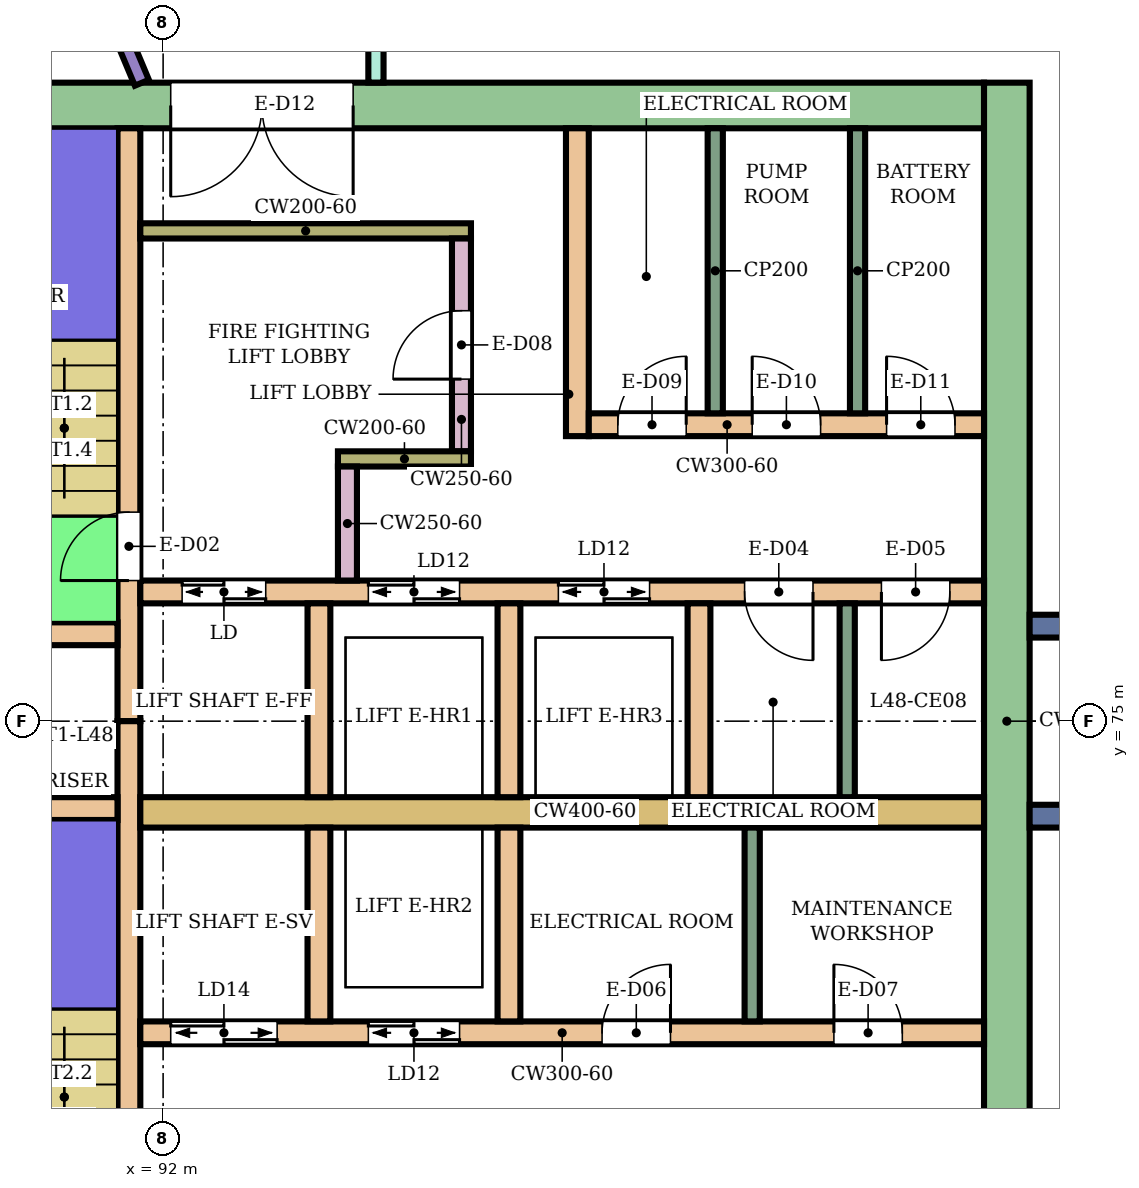
"""IFC4 building model, lengths in metres.
Left out: names, types, materials, properties, quantities, classifications, styles, units other than length and angle.
Written with IfcOpenShell. Run it as: python <this file> out.ifc"""

import sys

from ifc_helpers import new_model, si_unit, direction, frame, frame_2d, origin, place, context, subcontext, project, spatial, rectangle, extrude, element, fill, save


model = new_model("IFC4")
c1 = context("Model", 3, precision=1e-05, world=origin(), true_north=direction((0.0, 1.0)))
c2 = subcontext(c1, "Body", "Model", "MODEL_VIEW")
j1 = project(units=[si_unit("LENGTHUNIT", "METRE"), si_unit("PLANEANGLEUNIT", "RADIAN")], contexts=[c1])
p1 = place(None, origin())
s1 = spatial("IfcSite", under=j1, at=p1, CompositionType="ELEMENT")
p2 = place(p1, origin())
s2 = spatial("IfcBuilding", under=s1, at=p2, CompositionType="ELEMENT")
p3 = place(p2, frame((0.0, 0.0, 206.9)))
s3 = spatial("IfcBuildingStorey", under=s2, at=p3, CompositionType="ELEMENT", Elevation=206.9)
p4 = place(p3, frame((87.9, 83.1, 0.0), z_axis=(0.0, 0.0, 1.0), x_axis=(1.0, 0.0, 0.0)))
e1 = element("IfcWall", 1, at=p4, inside=s3, PredefinedType="SHEAR", context=c2, shape_type="SweptSolid", body=[
    extrude(rectangle(XDim=14.9, YDim=0.6, at=frame_2d((7.45, 0.0))), origin(), (0.0, 0.0, 1.0), 5.28),
])
p5 = place(p4, frame((4.2, 0.0, 0.0)))
e2 = element("IfcOpeningElement", 2, at=p5, cuts=e1, PredefinedType="OPENING", context=c2, shape_type="SweptSolid", body=[
    extrude(rectangle(XDim=2.4, YDim=2.4, at=frame_2d((1.2, 1.2))), frame((0.0, 0.31, 0.0), z_axis=(0.0, -1.0, 0.0), x_axis=(1.0, 0.0, 0.0)), (0.0, 0.0, 1.0), 0.62),
])
p6 = place(p3, frame((103.1, 66.6, 0.0), z_axis=(0.0, 0.0, 1.0), x_axis=(0.0, 1.0, 0.0)))
e3 = element("IfcWall", 3, at=p6, inside=s3, PredefinedType="SHEAR", context=c2, shape_type="SweptSolid", body=[
    extrude(rectangle(XDim=16.8, YDim=0.6, at=frame_2d((8.4, 0.0))), origin(), (0.0, 0.0, 1.0), 5.28),
])
p7 = place(p3, frame((91.55, 75.0, 0.0), z_axis=(0.0, 0.0, 1.0), x_axis=(0.0, 1.0, 0.0)))
e4 = element("IfcWall", 4, at=p7, inside=s3, PredefinedType="SHEAR", context=c2, shape_type="SweptSolid", body=[
    extrude(rectangle(XDim=7.8, YDim=0.3, at=frame_2d((3.9, 0.0))), origin(), (0.0, 0.0, 1.0), 5.28),
])
p8 = place(p7, frame((1.85, 0.0, 0.0)))
e5 = element("IfcOpeningElement", 5, at=p8, cuts=e4, PredefinedType="OPENING", context=c2, shape_type="SweptSolid", body=[
    extrude(rectangle(XDim=0.9, YDim=2.1, at=frame_2d((0.45, 1.05))), frame((0.0, 0.16, 0.0), z_axis=(0.0, -1.0, 0.0), x_axis=(1.0, 0.0, 0.0)), (0.0, 0.0, 1.0), 0.32),
])
p9 = place(p3, frame((91.55, 67.2, 0.0), z_axis=(0.0, 0.0, 1.0), x_axis=(0.0, 1.0, 0.0)))
e6 = element("IfcWall", 6, at=p9, inside=s3, PredefinedType="SHEAR", context=c2, shape_type="SweptSolid", body=[
    extrude(rectangle(XDim=7.8, YDim=0.3, at=frame_2d((3.9, 0.0))), origin(), (0.0, 0.0, 1.0), 5.28),
])
p10 = place(p9, frame((0.45, 0.0, 0.0)))
e7 = element("IfcOpeningElement", 7, at=p10, cuts=e6, PredefinedType="OPENING", context=c2, shape_type="SweptSolid", body=[
    extrude(rectangle(XDim=0.9, YDim=2.1, at=frame_2d((0.45, 1.05))), frame((0.0, 0.16, 0.0), z_axis=(0.0, -1.0, 0.0), x_axis=(1.0, 0.0, 0.0)), (0.0, 0.0, 1.0), 0.32),
])
p11 = place(p3, frame((88.35, 76.15, 0.0), z_axis=(0.0, 0.0, 1.0), x_axis=(1.0, 0.0, 0.0)))
e8 = element("IfcWall", 8, at=p11, inside=s3, PredefinedType="SHEAR", context=c2, shape_type="SweptSolid", body=[
    extrude(rectangle(XDim=3.05, YDim=0.3, at=frame_2d((1.525, 0.0))), origin(), (0.0, 0.0, 1.0), 5.28),
])
p12 = place(p11, frame((1.1, 0.0, 0.0)))
e9 = element("IfcOpeningElement", 9, at=p12, cuts=e8, PredefinedType="OPENING", context=c2, shape_type="SweptSolid", body=[
    extrude(rectangle(XDim=0.7, YDim=2.0, at=frame_2d((0.35, 1.0))), frame((0.0, 0.16, 0.0), z_axis=(0.0, -1.0, 0.0), x_axis=(1.0, 0.0, 0.0)), (0.0, 0.0, 1.0), 0.32),
])
p13 = place(p3, frame((88.35, 73.85, 0.0), z_axis=(0.0, 0.0, 1.0), x_axis=(1.0, 0.0, 0.0)))
e10 = element("IfcWall", 10, at=p13, inside=s3, PredefinedType="SHEAR", context=c2, shape_type="SweptSolid", body=[
    extrude(rectangle(XDim=3.05, YDim=0.3, at=frame_2d((1.525, 0.0))), origin(), (0.0, 0.0, 1.0), 5.28),
])
p14 = place(p3, frame((91.7, 76.7, 0.0), z_axis=(0.0, 0.0, 1.0), x_axis=(1.0, 0.0, 0.0)))
e11 = element("IfcWall", 11, at=p14, inside=s3, PredefinedType="SHEAR", context=c2, shape_type="SweptSolid", body=[
    extrude(rectangle(XDim=11.1, YDim=0.3, at=frame_2d((5.55, 0.0))), origin(), (0.0, 0.0, 1.0), 5.28),
])
p15 = place(p14, frame((0.55, 0.0, 0.0)))
e12 = element("IfcOpeningElement", 12, at=p15, cuts=e11, PredefinedType="OPENING", context=c2, shape_type="SweptSolid", body=[
    extrude(rectangle(XDim=1.1, YDim=2.1, at=frame_2d((0.55, 1.05))), frame((0.0, 0.16, 0.0), z_axis=(0.0, -1.0, 0.0), x_axis=(1.0, 0.0, 0.0)), (0.0, 0.0, 1.0), 0.32),
])
p16 = place(p14, frame((3.0, 0.0, 0.0)))
e13 = element("IfcOpeningElement", 13, at=p16, cuts=e11, PredefinedType="OPENING", context=c2, shape_type="SweptSolid", body=[
    extrude(rectangle(XDim=1.2, YDim=2.1, at=frame_2d((0.6, 1.05))), frame((0.0, 0.16, 0.0), z_axis=(0.0, -1.0, 0.0), x_axis=(1.0, 0.0, 0.0)), (0.0, 0.0, 1.0), 0.32),
])
p17 = place(p14, frame((5.5, 0.0, 0.0)))
e14 = element("IfcOpeningElement", 14, at=p17, cuts=e11, PredefinedType="OPENING", context=c2, shape_type="SweptSolid", body=[
    extrude(rectangle(XDim=1.2, YDim=2.1, at=frame_2d((0.6, 1.05))), frame((0.0, 0.16, 0.0), z_axis=(0.0, -1.0, 0.0), x_axis=(1.0, 0.0, 0.0)), (0.0, 0.0, 1.0), 0.32),
])
p18 = place(p14, frame((7.95, 0.0, 0.0)))
e15 = element("IfcOpeningElement", 15, at=p18, cuts=e11, PredefinedType="OPENING", context=c2, shape_type="SweptSolid", body=[
    extrude(rectangle(XDim=0.9, YDim=2.1, at=frame_2d((0.45, 1.05))), frame((0.0, 0.16, 0.0), z_axis=(0.0, -1.0, 0.0), x_axis=(1.0, 0.0, 0.0)), (0.0, 0.0, 1.0), 0.32),
])
p19 = place(p14, frame((9.75, 0.0, 0.0)))
e16 = element("IfcOpeningElement", 16, at=p19, cuts=e11, PredefinedType="OPENING", context=c2, shape_type="SweptSolid", body=[
    extrude(rectangle(XDim=0.9, YDim=2.1, at=frame_2d((0.45, 1.05))), frame((0.0, 0.16, 0.0), z_axis=(0.0, -1.0, 0.0), x_axis=(1.0, 0.0, 0.0)), (0.0, 0.0, 1.0), 0.32),
])
p20 = place(p3, frame((91.7, 73.8, 0.0), z_axis=(0.0, 0.0, 1.0), x_axis=(1.0, 0.0, 0.0)))
e17 = element("IfcWall", 17, at=p20, inside=s3, PredefinedType="SHEAR", context=c2, shape_type="SweptSolid", body=[
    extrude(rectangle(XDim=11.1, YDim=0.4, at=frame_2d((5.55, 0.0))), origin(), (0.0, 0.0, 1.0), 5.28),
])
p21 = place(p3, frame((91.7, 70.9, 0.0), z_axis=(0.0, 0.0, 1.0), x_axis=(1.0, 0.0, 0.0)))
e18 = element("IfcWall", 18, at=p21, inside=s3, PredefinedType="SHEAR", context=c2, shape_type="SweptSolid", body=[
    extrude(rectangle(XDim=11.1, YDim=0.3, at=frame_2d((5.55, 0.0))), origin(), (0.0, 0.0, 1.0), 5.28),
])
p22 = place(p21, frame((0.4, 0.0, 0.0)))
e19 = element("IfcOpeningElement", 19, at=p22, cuts=e18, PredefinedType="OPENING", context=c2, shape_type="SweptSolid", body=[
    extrude(rectangle(XDim=1.4, YDim=2.1, at=frame_2d((0.7, 1.05))), frame((0.0, 0.16, 0.0), z_axis=(0.0, -1.0, 0.0), x_axis=(1.0, 0.0, 0.0)), (0.0, 0.0, 1.0), 0.32),
])
p23 = place(p21, frame((3.0, 0.0, 0.0)))
e20 = element("IfcOpeningElement", 20, at=p23, cuts=e18, PredefinedType="OPENING", context=c2, shape_type="SweptSolid", body=[
    extrude(rectangle(XDim=1.2, YDim=2.1, at=frame_2d((0.6, 1.05))), frame((0.0, 0.16, 0.0), z_axis=(0.0, -1.0, 0.0), x_axis=(1.0, 0.0, 0.0)), (0.0, 0.0, 1.0), 0.32),
])
p24 = place(p21, frame((6.075, 0.0, 0.0)))
e21 = element("IfcOpeningElement", 21, at=p24, cuts=e18, PredefinedType="OPENING", context=c2, shape_type="SweptSolid", body=[
    extrude(rectangle(XDim=0.9, YDim=2.1, at=frame_2d((0.45, 1.05))), frame((0.0, 0.16, 0.0), z_axis=(0.0, -1.0, 0.0), x_axis=(1.0, 0.0, 0.0)), (0.0, 0.0, 1.0), 0.32),
])
p25 = place(p21, frame((9.125, 0.0, 0.0)))
e22 = element("IfcOpeningElement", 22, at=p25, cuts=e18, PredefinedType="OPENING", context=c2, shape_type="SweptSolid", body=[
    extrude(rectangle(XDim=0.9, YDim=2.1, at=frame_2d((0.45, 1.05))), frame((0.0, 0.16, 0.0), z_axis=(0.0, -1.0, 0.0), x_axis=(1.0, 0.0, 0.0)), (0.0, 0.0, 1.0), 0.32),
])
for number, where, z_axis, x_axis in (
    (23, (94.05, 74.0, 0.0), (0.0, 0.0, 1.0), (0.0, 1.0, 0.0)),
    (24, (96.55, 74.0, 0.0), (0.0, 0.0, 1.0), (0.0, 1.0, 0.0)),
    (25, (99.05, 74.0, 0.0), (0.0, 0.0, 1.0), (0.0, 1.0, 0.0)),
    (26, (94.05, 71.05, 0.0), (0.0, 0.0, 1.0), (0.0, 1.0, 0.0)),
    (27, (96.55, 71.05, 0.0), (0.0, 0.0, 1.0), (0.0, 1.0, 0.0)),
):
    element("IfcWall", number, at=place(p3, frame(where, z_axis=z_axis, x_axis=x_axis)), inside=s3, PredefinedType="SHEAR", context=c2, shape_type="SweptSolid", body=[
        extrude(rectangle(XDim=2.55, YDim=0.3, at=frame_2d((1.275, 0.0))), origin(), (0.0, 0.0, 1.0), 5.28),
    ])
p26 = place(p3, frame((91.7, 81.45, 0.0), z_axis=(0.0, 0.0, 1.0), x_axis=(1.0, 0.0, 0.0)))
e28 = element("IfcWall", 28, at=p26, inside=s3, PredefinedType="SHEAR", context=c2, shape_type="SweptSolid", body=[
    extrude(rectangle(XDim=4.35, YDim=0.2, at=frame_2d((2.175, 0.0))), origin(), (0.0, 0.0, 1.0), 5.28),
])
p27 = place(p3, frame((95.925, 78.55, 0.0), z_axis=(0.0, 0.0, 1.0), x_axis=(0.0, 1.0, 0.0)))
e29 = element("IfcWall", 29, at=p27, inside=s3, PredefinedType="SHEAR", context=c2, shape_type="SweptSolid", body=[
    extrude(rectangle(XDim=2.8, YDim=0.25, at=frame_2d((1.4, 0.0))), origin(), (0.0, 0.0, 1.0), 5.28),
])
p28 = place(p27, frame((0.95, 0.0, 0.0)))
e30 = element("IfcOpeningElement", 30, at=p28, cuts=e29, PredefinedType="OPENING", context=c2, shape_type="SweptSolid", body=[
    extrude(rectangle(XDim=0.9, YDim=2.1, at=frame_2d((0.45, 1.05))), frame((0.0, 0.135, 0.0), z_axis=(0.0, -1.0, 0.0), x_axis=(1.0, 0.0, 0.0)), (0.0, 0.0, 1.0), 0.27),
])
p29 = place(p3, frame((94.3, 78.45, 0.0), z_axis=(0.0, 0.0, 1.0), x_axis=(1.0, 0.0, 0.0)))
e31 = element("IfcWall", 31, at=p29, inside=s3, PredefinedType="SHEAR", context=c2, shape_type="SweptSolid", body=[
    extrude(rectangle(XDim=1.75, YDim=0.2, at=frame_2d((0.875, 0.0))), origin(), (0.0, 0.0, 1.0), 5.28),
])
p30 = place(p3, frame((94.425, 76.85, 0.0), z_axis=(0.0, 0.0, 1.0), x_axis=(0.0, 1.0, 0.0)))
e32 = element("IfcWall", 32, at=p30, inside=s3, PredefinedType="SHEAR", context=c2, shape_type="SweptSolid", body=[
    extrude(rectangle(XDim=1.5, YDim=0.25, at=frame_2d((0.75, 0.0))), origin(), (0.0, 0.0, 1.0), 5.28),
])
p31 = place(p3, frame((97.45, 78.75, 0.0), z_axis=(0.0, 0.0, 1.0), x_axis=(0.0, 1.0, 0.0)))
e33 = element("IfcWall", 33, at=p31, inside=s3, PredefinedType="SHEAR", context=c2, shape_type="SweptSolid", body=[
    extrude(rectangle(XDim=4.05, YDim=0.3, at=frame_2d((2.025, 0.0))), origin(), (0.0, 0.0, 1.0), 5.28),
])
p32 = place(p3, frame((97.6, 78.9, 0.0), z_axis=(0.0, 0.0, 1.0), x_axis=(1.0, 0.0, 0.0)))
e34 = element("IfcWall", 34, at=p32, inside=s3, PredefinedType="SHEAR", context=c2, shape_type="SweptSolid", body=[
    extrude(rectangle(XDim=5.2, YDim=0.3, at=frame_2d((2.6, 0.0))), origin(), (0.0, 0.0, 1.0), 5.28),
])
p33 = place(p32, frame((0.382, 0.0, 0.0)))
e35 = element("IfcOpeningElement", 35, at=p33, cuts=e34, PredefinedType="OPENING", context=c2, shape_type="SweptSolid", body=[
    extrude(rectangle(XDim=0.9, YDim=2.1, at=frame_2d((0.45, 1.05))), frame((0.0, 0.16, 0.0), z_axis=(0.0, -1.0, 0.0), x_axis=(1.0, 0.0, 0.0)), (0.0, 0.0, 1.0), 0.32),
])
p34 = place(p32, frame((2.15, 0.0, 0.0)))
e36 = element("IfcOpeningElement", 36, at=p34, cuts=e34, PredefinedType="OPENING", context=c2, shape_type="SweptSolid", body=[
    extrude(rectangle(XDim=0.9, YDim=2.1, at=frame_2d((0.45, 1.05))), frame((0.0, 0.16, 0.0), z_axis=(0.0, -1.0, 0.0), x_axis=(1.0, 0.0, 0.0)), (0.0, 0.0, 1.0), 0.32),
])
p35 = place(p32, frame((3.918, 0.0, 0.0)))
e37 = element("IfcOpeningElement", 37, at=p35, cuts=e34, PredefinedType="OPENING", context=c2, shape_type="SweptSolid", body=[
    extrude(rectangle(XDim=0.9, YDim=2.1, at=frame_2d((0.45, 1.05))), frame((0.0, 0.16, 0.0), z_axis=(0.0, -1.0, 0.0), x_axis=(1.0, 0.0, 0.0)), (0.0, 0.0, 1.0), 0.32),
])
for number, where, z_axis, x_axis in (
    (38, (103.4, 73.75, 0.0), (0.0, 0.0, 1.0), (1.0, 0.0, 0.0)),
    (39, (103.4, 76.25, 0.0), (0.0, 0.0, 1.0), (1.0, 0.0, 0.0)),
):
    element("IfcWall", number, at=place(p3, frame(where, z_axis=z_axis, x_axis=x_axis)), inside=s3, PredefinedType="NOTDEFINED", context=c2, shape_type="SweptSolid", body=[
        extrude(rectangle(XDim=2.416, YDim=0.3, at=frame_2d((1.208, 0.0))), origin(), (0.0, 0.0, 1.0), 5.6),
    ])
p36 = place(p3, frame((88.697, 90.624, 0.0), z_axis=(0.0, 0.0, 1.0), x_axis=(0.386027055918, -0.922487459047, 0.0)))
e40 = element("IfcWall", 40, at=p36, inside=s3, PredefinedType="PARTITIONING", context=c2, shape_type="SweptSolid", body=[
    extrude(rectangle(XDim=7.832, YDim=0.2, at=frame_2d((3.916, 0.0))), origin(), (0.0, 0.0, 1.0), 5.15),
])
p37 = place(p36, frame((3.482, 0.0, 0.0)))
e41 = element("IfcOpeningElement", 41, at=p37, cuts=e40, PredefinedType="OPENING", context=c2, shape_type="SweptSolid", body=[
    extrude(rectangle(XDim=1.2, YDim=2.4, at=frame_2d((0.6, 1.2))), frame((0.0, 0.11, 0.0), z_axis=(0.0, -1.0, 0.0), x_axis=(1.0, 0.0, 0.0)), (0.0, 0.0, 1.0), 0.22),
])
p38 = place(p3, frame((94.8, 83.401, 0.0), z_axis=(0.0, 0.0, 1.0), x_axis=(0.0, 1.0, 0.0)))
e42 = element("IfcWall", 42, at=p38, inside=s3, PredefinedType="PARTITIONING", context=c2, shape_type="SweptSolid", body=[
    extrude(rectangle(XDim=1.499, YDim=0.2, at=frame_2d((0.75, 0.0))), origin(), (0.0, 0.0, 1.0), 5.15),
])
for number, where, z_axis, x_axis in (
    (43, (101.0, 74.0, 0.0), (0.0, 0.0, 1.0), (0.0, 1.0, 0.0)),
    (44, (99.75, 71.05, 0.0), (0.0, 0.0, 1.0), (0.0, 1.0, 0.0)),
):
    element("IfcWall", number, at=place(p3, frame(where, z_axis=z_axis, x_axis=x_axis)), inside=s3, PredefinedType="PARTITIONING", context=c2, shape_type="SweptSolid", body=[
        extrude(rectangle(XDim=2.55, YDim=0.2, at=frame_2d((1.275, 0.0))), origin(), (0.0, 0.0, 1.0), 5.28),
    ])
for number, where, z_axis, x_axis in (
    (45, (99.264, 79.05, 0.0), (0.0, 0.0, 1.0), (0.0, 1.0, 0.0)),
    (46, (101.136, 79.05, 0.0), (0.0, 0.0, 1.0), (0.0, 1.0, 0.0)),
):
    element("IfcWall", number, at=place(p3, frame(where, z_axis=z_axis, x_axis=x_axis)), inside=s3, PredefinedType="PARTITIONING", context=c2, shape_type="SweptSolid", body=[
        extrude(rectangle(XDim=3.75, YDim=0.2, at=frame_2d((1.875, 0.0))), origin(), (0.0, 0.0, 1.0), 5.28),
    ])
p39 = place(p8, origin())
e47 = element("IfcDoor", 47, at=p39, inside=s3, OperationType="SINGLE_SWING_LEFT", PredefinedType="DOOR", context=c2, shape_type="SweptSolid", body=[
    extrude(rectangle(XDim=0.9, YDim=2.1, at=frame_2d((0.45, 1.05))), frame((0.0, 0.025, 0.0), z_axis=(0.0, -1.0, 0.0), x_axis=(1.0, 0.0, 0.0)), (0.0, 0.0, 1.0), 0.05),
])
fill(e5, e47)
p40 = place(p15, origin())
e48 = element("IfcDoor", 48, at=p40, inside=s3, OperationType="DOUBLE_DOOR_SLIDING", PredefinedType="DOOR", context=c2, shape_type="SweptSolid", body=[
    extrude(rectangle(XDim=1.1, YDim=2.1, at=frame_2d((0.55, 1.05))), frame((0.0, 0.025, 0.0), z_axis=(0.0, -1.0, 0.0), x_axis=(1.0, 0.0, 0.0)), (0.0, 0.0, 1.0), 0.05),
])
fill(e12, e48)
p41 = place(p16, origin())
e49 = element("IfcDoor", 49, at=p41, inside=s3, OperationType="DOUBLE_DOOR_SLIDING", PredefinedType="DOOR", context=c2, shape_type="SweptSolid", body=[
    extrude(rectangle(XDim=1.2, YDim=2.1, at=frame_2d((0.6, 1.05))), frame((0.0, 0.025, 0.0), z_axis=(0.0, -1.0, 0.0), x_axis=(1.0, 0.0, 0.0)), (0.0, 0.0, 1.0), 0.05),
])
fill(e13, e49)
p42 = place(p17, origin())
e50 = element("IfcDoor", 50, at=p42, inside=s3, OperationType="DOUBLE_DOOR_SLIDING", PredefinedType="DOOR", context=c2, shape_type="SweptSolid", body=[
    extrude(rectangle(XDim=1.2, YDim=2.1, at=frame_2d((0.6, 1.05))), frame((0.0, 0.025, 0.0), z_axis=(0.0, -1.0, 0.0), x_axis=(1.0, 0.0, 0.0)), (0.0, 0.0, 1.0), 0.05),
])
fill(e14, e50)
p43 = place(p18, frame((0.9, 0.0, 0.0), z_axis=(0.0, 0.0, 1.0), x_axis=(-1.0, 0.0, 0.0)))
e51 = element("IfcDoor", 51, at=p43, inside=s3, OperationType="SINGLE_SWING_LEFT", PredefinedType="DOOR", context=c2, shape_type="SweptSolid", body=[
    extrude(rectangle(XDim=0.9, YDim=2.1, at=frame_2d((0.45, 1.05))), frame((0.0, 0.025, 0.0), z_axis=(0.0, -1.0, 0.0), x_axis=(1.0, 0.0, 0.0)), (0.0, 0.0, 1.0), 0.05),
])
fill(e15, e51)
p44 = place(p19, frame((0.9, 0.0, 0.0), z_axis=(0.0, 0.0, 1.0), x_axis=(-1.0, 0.0, 0.0)))
e52 = element("IfcDoor", 52, at=p44, inside=s3, OperationType="SINGLE_SWING_RIGHT", PredefinedType="DOOR", context=c2, shape_type="SweptSolid", body=[
    extrude(rectangle(XDim=0.9, YDim=2.1, at=frame_2d((0.45, 1.05))), frame((0.0, 0.025, 0.0), z_axis=(0.0, -1.0, 0.0), x_axis=(1.0, 0.0, 0.0)), (0.0, 0.0, 1.0), 0.05),
])
fill(e16, e52)
p45 = place(p22, origin())
e53 = element("IfcDoor", 53, at=p45, inside=s3, OperationType="DOUBLE_DOOR_SLIDING", PredefinedType="DOOR", context=c2, shape_type="SweptSolid", body=[
    extrude(rectangle(XDim=1.4, YDim=2.1, at=frame_2d((0.7, 1.05))), frame((0.0, 0.025, 0.0), z_axis=(0.0, -1.0, 0.0), x_axis=(1.0, 0.0, 0.0)), (0.0, 0.0, 1.0), 0.05),
])
fill(e19, e53)
p46 = place(p23, origin())
e54 = element("IfcDoor", 54, at=p46, inside=s3, OperationType="DOUBLE_DOOR_SLIDING", PredefinedType="DOOR", context=c2, shape_type="SweptSolid", body=[
    extrude(rectangle(XDim=1.2, YDim=2.1, at=frame_2d((0.6, 1.05))), frame((0.0, 0.025, 0.0), z_axis=(0.0, -1.0, 0.0), x_axis=(1.0, 0.0, 0.0)), (0.0, 0.0, 1.0), 0.05),
])
fill(e20, e54)
p47 = place(p24, origin())
e55 = element("IfcDoor", 55, at=p47, inside=s3, OperationType="SINGLE_SWING_RIGHT", PredefinedType="DOOR", context=c2, shape_type="SweptSolid", body=[
    extrude(rectangle(XDim=0.9, YDim=2.1, at=frame_2d((0.45, 1.05))), frame((0.0, 0.025, 0.0), z_axis=(0.0, -1.0, 0.0), x_axis=(1.0, 0.0, 0.0)), (0.0, 0.0, 1.0), 0.05),
])
fill(e21, e55)
p48 = place(p25, origin())
e56 = element("IfcDoor", 56, at=p48, inside=s3, OperationType="SINGLE_SWING_LEFT", PredefinedType="DOOR", context=c2, shape_type="SweptSolid", body=[
    extrude(rectangle(XDim=0.9, YDim=2.1, at=frame_2d((0.45, 1.05))), frame((0.0, 0.025, 0.0), z_axis=(0.0, -1.0, 0.0), x_axis=(1.0, 0.0, 0.0)), (0.0, 0.0, 1.0), 0.05),
])
fill(e22, e56)
p49 = place(p28, origin())
e57 = element("IfcDoor", 57, at=p49, inside=s3, OperationType="SINGLE_SWING_LEFT", PredefinedType="DOOR", context=c2, shape_type="SweptSolid", body=[
    extrude(rectangle(XDim=0.9, YDim=2.1, at=frame_2d((0.45, 1.05))), frame((0.0, 0.025, 0.0), z_axis=(0.0, -1.0, 0.0), x_axis=(1.0, 0.0, 0.0)), (0.0, 0.0, 1.0), 0.05),
])
fill(e30, e57)
p50 = place(p33, origin())
e58 = element("IfcDoor", 58, at=p50, inside=s3, OperationType="SINGLE_SWING_RIGHT", PredefinedType="DOOR", context=c2, shape_type="SweptSolid", body=[
    extrude(rectangle(XDim=0.9, YDim=2.1, at=frame_2d((0.45, 1.05))), frame((0.0, 0.025, 0.0), z_axis=(0.0, -1.0, 0.0), x_axis=(1.0, 0.0, 0.0)), (0.0, 0.0, 1.0), 0.05),
])
fill(e35, e58)
p51 = place(p34, origin())
e59 = element("IfcDoor", 59, at=p51, inside=s3, OperationType="SINGLE_SWING_LEFT", PredefinedType="DOOR", context=c2, shape_type="SweptSolid", body=[
    extrude(rectangle(XDim=0.9, YDim=2.1, at=frame_2d((0.45, 1.05))), frame((0.0, 0.025, 0.0), z_axis=(0.0, -1.0, 0.0), x_axis=(1.0, 0.0, 0.0)), (0.0, 0.0, 1.0), 0.05),
])
fill(e36, e59)
p52 = place(p35, origin())
e60 = element("IfcDoor", 60, at=p52, inside=s3, OperationType="SINGLE_SWING_LEFT", PredefinedType="DOOR", context=c2, shape_type="SweptSolid", body=[
    extrude(rectangle(XDim=0.9, YDim=2.1, at=frame_2d((0.45, 1.05))), frame((0.0, 0.025, 0.0), z_axis=(0.0, -1.0, 0.0), x_axis=(1.0, 0.0, 0.0)), (0.0, 0.0, 1.0), 0.05),
])
fill(e37, e60)
p53 = place(p5, frame((2.4, 0.0, 0.0), z_axis=(0.0, 0.0, 1.0), x_axis=(-1.0, 0.0, 0.0)))
e61 = element("IfcDoor", 61, at=p53, inside=s3, OperationType="DOUBLE_DOOR_SINGLE_SWING", PredefinedType="DOOR", context=c2, shape_type="SweptSolid", body=[
    extrude(rectangle(XDim=2.4, YDim=2.4, at=frame_2d((1.2, 1.2))), frame((0.0, 0.025, 0.0), z_axis=(0.0, -1.0, 0.0), x_axis=(1.0, 0.0, 0.0)), (0.0, 0.0, 1.0), 0.05),
])
fill(e2, e61)
save(model, sys.argv[1])
